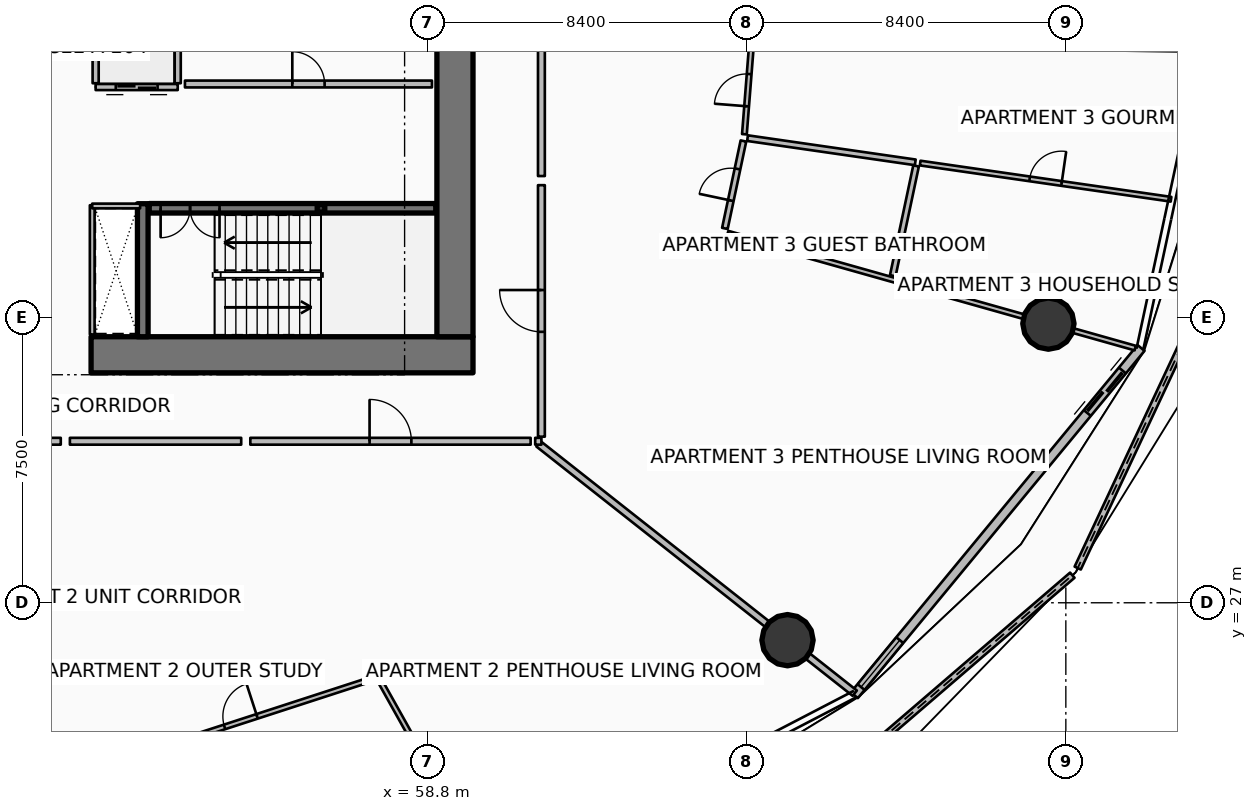
"""IFC4 building model, lengths in metres.
Left out: names, types, materials, properties, quantities, classifications, styles, units other than length and angle.
Written with IfcOpenShell. Run it as: python <this file> out.ifc"""

import sys

from ifc_helpers import new_model, si_unit, direction, frame, frame_2d, origin, origin_2d, place, context, subcontext, project, spatial, polyline, rectangle, hollow_rectangle, circle, outline, extrude, element, fill, save


model = new_model("IFC4")
c1 = context("Model", 3, precision=1e-05, world=origin(), true_north=direction((0.0, 1.0)))
c2 = subcontext(c1, "Body", "Model", "MODEL_VIEW")
j1 = project(units=[si_unit("LENGTHUNIT", "METRE"), si_unit("PLANEANGLEUNIT", "RADIAN")], contexts=[c1])
p1 = place(None, origin())
s1 = spatial("IfcSite", under=j1, at=p1, CompositionType="ELEMENT")
p2 = place(p1, origin())
s2 = spatial("IfcBuilding", under=s1, at=p2, CompositionType="ELEMENT")
p3 = place(p2, frame((0.0, 0.0, 45.15)))
s3 = spatial("IfcBuildingStorey", under=s2, at=p3, CompositionType="ELEMENT", Elevation=45.15)
p4 = place(p3, frame((49.95, 33.525, 0.0), z_axis=(0.0, 0.0, 1.0), x_axis=(1.0, 0.0, 0.0)))
e1 = element("IfcWall", 1, at=p4, inside=s3, PredefinedType="SHEAR", context=c2, shape_type="SweptSolid", body=[
    extrude(rectangle(XDim=10.05, YDim=0.95, at=frame_2d((5.025, 0.0))), origin(), (0.0, 0.0, 1.0), 3.75),
])
p5 = place(p3, frame((59.525, 34.0, 0.0), z_axis=(0.0, 0.0, 1.0), x_axis=(0.0, 1.0, 0.0)))
e2 = element("IfcWall", 2, at=p5, inside=s3, PredefinedType="SHEAR", context=c2, shape_type="SweptSolid", body=[
    extrude(rectangle(XDim=16.0, YDim=0.95, at=frame_2d((8.0, 0.0))), origin(), (0.0, 0.0, 1.0), 3.75),
])
p6 = place(p3, frame((51.31, 34.0, 0.0), z_axis=(0.0, 0.0, 1.0), x_axis=(0.0, 1.0, 0.0)))
e3 = element("IfcWall", 3, at=p6, inside=s3, PredefinedType="SHEAR", context=c2, shape_type="SweptSolid", body=[
    extrude(rectangle(XDim=3.5, YDim=0.28, at=frame_2d((1.75, 0.0))), origin(), (0.0, 0.0, 1.0), 3.75),
])
p7 = place(p3, frame((56.0, 37.38, 0.0), z_axis=(0.0, 0.0, 1.0), x_axis=(1.0, 0.0, 0.0)))
e4 = element("IfcColumn", 4, at=p7, inside=s3, PredefinedType="COLUMN", context=c2, shape_type="SweptSolid", body=[
    extrude(hollow_rectangle(XDim=0.2, YDim=0.2, WallThickness=0.01, InnerFilletRadius=0.01, OuterFilletRadius=0.02, at=origin_2d()), origin(), (0.0, 0.0, 1.0), 1.67),
])
for number, where, z_axis, x_axis in (
    (5, (68.276, 26.016, 0.0), (0.0, 0.0, 1.0), (1.0, 0.0, 0.0)),
    (6, (75.141, 34.345, 0.0), (0.0, 0.0, 1.0), (1.0, 0.0, 0.0)),
):
    element("IfcColumn", number, at=place(p3, frame(where, z_axis=z_axis, x_axis=x_axis)), inside=s3, PredefinedType="COLUMN", context=c2, shape_type="SweptSolid", body=[
        extrude(circle(Radius=0.675, at=origin_2d()), origin(), (0.0, 0.0, 1.0), 3.5),
    ])
p8 = place(p3, frame((66.92, 20.119, 0.0), z_axis=(0.0, 0.0, 1.0), x_axis=(0.758371329303, 0.651822772609, 0.0)))
e7 = element("IfcWall", 7, at=p8, inside=s3, PredefinedType="PARAPET", context=c2, shape_type="SweptSolid", body=[
    extrude(outline(polyline([(0.0, 0.0), (11.67, 0.0), (11.67, 1.148), (5.835, 1.284), (0.0, 1.483), (0.0, 0.0)])), frame((0.0, 0.09, 0.0), z_axis=(0.0, -1.0, 0.0), x_axis=(1.0, 0.0, 0.0)), (0.0, 0.0, 1.0), 0.18),
])
p9 = place(p3, frame((75.912, 27.913, 0.0), z_axis=(0.0, 0.0, 1.0), x_axis=(0.424187605295, 0.905574334615, 0.0)))
e8 = element("IfcWall", 8, at=p9, inside=s3, PredefinedType="PARAPET", context=c2, shape_type="SweptSolid", body=[
    extrude(outline(polyline([(0.0, 0.0), (12.446, 0.0), (12.446, 1.224), (6.223, 1.127), (0.0, 1.148), (0.0, 0.0)])), frame((0.0, 0.09, 0.0), z_axis=(0.0, -1.0, 0.0), x_axis=(1.0, 0.0, 0.0)), (0.0, 0.0, 1.0), 0.18),
])
p10 = place(p3, frame((70.033, 24.567, 0.0), z_axis=(0.0, 0.0, 1.0), x_axis=(0.636674332663, 0.771132799281, 0.0)))
e9 = element("IfcWall", 9, at=p10, inside=s3, PredefinedType="SOLIDWALL", context=c2, shape_type="SweptSolid", body=[
    extrude(rectangle(XDim=11.851, YDim=0.24, at=frame_2d((5.926, 0.0))), origin(), (0.0, 0.0, 1.0), 2.45),
])
p11 = place(p10, frame((9.631, 0.0, 0.0)))
e10 = element("IfcOpeningElement", 10, at=p11, cuts=e9, PredefinedType="OPENING", context=c2, shape_type="SweptSolid", body=[
    extrude(rectangle(XDim=1.45, YDim=2.15, at=frame_2d((0.725, 1.075))), frame((0.0, 0.13, 0.0), z_axis=(0.0, -1.0, 0.0), x_axis=(1.0, 0.0, 0.0)), (0.0, 0.0, 1.0), 0.26),
])
p12 = place(p10, frame((0.28, 0.0, 0.65)))
e11 = element("IfcOpeningElement", 11, at=p12, cuts=e9, PredefinedType="OPENING", context=c2, shape_type="SweptSolid", body=[
    extrude(rectangle(XDim=1.6, YDim=1.5, at=frame_2d((0.8, 0.75))), frame((0.0, 0.13, 0.0), z_axis=(0.0, -1.0, 0.0), x_axis=(1.0, 0.0, 0.0)), (0.0, 0.0, 1.0), 0.26),
])
p13 = place(p3, frame((51.48, 37.38, 0.0), z_axis=(0.0, 0.0, 1.0), x_axis=(1.0, 0.0, 0.0)))
e12 = element("IfcWall", 12, at=p13, inside=s3, PredefinedType="SOLIDWALL", context=c2, shape_type="SweptSolid", body=[
    extrude(rectangle(XDim=7.54, YDim=0.25, at=frame_2d((3.77, 0.0))), origin(), (0.0, 0.0, 1.0), 3.5),
])
p14 = place(p13, frame((0.3, 0.0, 0.0)))
e13 = element("IfcOpeningElement", 13, at=p14, cuts=e12, PredefinedType="OPENING", context=c2, shape_type="SweptSolid", body=[
    extrude(rectangle(XDim=1.55, YDim=2.15, at=frame_2d((0.775, 1.075))), frame((0.0, 0.135, 0.0), z_axis=(0.0, -1.0, 0.0), x_axis=(1.0, 0.0, 0.0)), (0.0, 0.0, 1.0), 0.27),
])
p15 = place(p3, frame((52.23, 40.57, 0.0), z_axis=(0.0, 0.0, 1.0), x_axis=(-1.0, 0.0, 0.0)))
e14 = element("IfcWall", 14, at=p15, inside=s3, PredefinedType="PARTITIONING", context=c2, shape_type="SweptSolid", body=[
    extrude(rectangle(XDim=2.16, YDim=0.16, at=frame_2d((1.08, 0.0))), origin(), (0.0, 0.0, 1.0), 3.5),
])
p16 = place(p15, frame((0.53, 0.0, 0.0)))
e15 = element("IfcOpeningElement", 15, at=p16, cuts=e14, PredefinedType="OPENING", context=c2, shape_type="SweptSolid", body=[
    extrude(rectangle(XDim=1.1, YDim=2.1, at=frame_2d((0.55, 1.05))), frame((0.0, 0.09, 0.0), z_axis=(0.0, -1.0, 0.0), x_axis=(1.0, 0.0, 0.0)), (0.0, 0.0, 1.0), 0.18),
])
for number, where, z_axis, x_axis in (
    (16, (52.23, 40.67, 0.0), (0.0, 0.0, 1.0), (0.0, 1.0, 0.0)),
    (17, (50.07, 40.67, 0.0), (0.0, 0.0, 1.0), (0.0, 1.0, 0.0)),
):
    element("IfcWall", number, at=place(p3, frame(where, z_axis=z_axis, x_axis=x_axis)), inside=s3, PredefinedType="PARTITIONING", context=c2, shape_type="SweptSolid", body=[
        extrude(rectangle(XDim=2.16, YDim=0.16, at=frame_2d((1.08, 0.0))), origin(), (0.0, 0.0, 1.0), 3.5),
    ])
p17 = place(p3, frame((52.42, 40.65, 0.0), z_axis=(0.0, 0.0, 1.0), x_axis=(1.0, 0.0, 0.0)))
e18 = element("IfcWall", 18, at=p17, inside=s3, PredefinedType="PARTITIONING", context=c2, shape_type="SweptSolid", body=[
    extrude(rectangle(XDim=6.5, YDim=0.18, at=frame_2d((3.25, 0.0))), origin(), (0.0, 0.0, 1.0), 3.5),
])
p18 = place(p17, frame((2.825, 0.0, 0.0)))
e19 = element("IfcOpeningElement", 19, at=p18, cuts=e18, PredefinedType="OPENING", context=c2, shape_type="SweptSolid", body=[
    extrude(rectangle(XDim=0.85, YDim=2.06, at=frame_2d((0.425, 1.03))), frame((0.0, 0.1, 0.0), z_axis=(0.0, -1.0, 0.0), x_axis=(1.0, 0.0, 0.0)), (0.0, 0.0, 1.0), 0.2),
])
p19 = place(p3, frame((49.98, 34.06, 0.0), z_axis=(0.0, 0.0, 1.0), x_axis=(0.0, 1.0, 0.0)))
e20 = element("IfcWall", 20, at=p19, inside=s3, PredefinedType="PARTITIONING", context=c2, shape_type="SweptSolid", body=[
    extrude(rectangle(XDim=3.4, YDim=0.125, at=frame_2d((1.7, 0.0))), origin(), (0.0, 0.0, 1.0), 2.94),
])
p20 = place(p3, frame((49.98, 37.44, 0.0), z_axis=(0.0, 0.0, 1.0), x_axis=(1.0, 0.0, 0.0)))
e21 = element("IfcWall", 21, at=p20, inside=s3, PredefinedType="PARTITIONING", context=c2, shape_type="SweptSolid", body=[
    extrude(rectangle(XDim=1.26, YDim=0.125, at=frame_2d((0.63, 0.0))), origin(), (0.0, 0.0, 1.0), 2.94),
])
p21 = place(p3, frame((61.723, 31.182, 0.0), z_axis=(0.0, 0.0, 1.0), x_axis=(0.785321288316, -0.619088421889, 0.0)))
e22 = element("IfcWall", 22, at=p21, inside=s3, PredefinedType="PARTITIONING", context=c2, shape_type="SweptSolid", body=[
    extrude(rectangle(XDim=10.598, YDim=0.18, at=frame_2d((5.299, 0.0))), origin(), (0.0, 0.0, 1.0), 2.867),
])
p22 = place(p3, frame((54.14, 31.25, 0.0), z_axis=(0.0, 0.0, 1.0), x_axis=(1.0, 0.0, 0.0)))
e23 = element("IfcWall", 23, at=p22, inside=s3, PredefinedType="PARTITIONING", context=c2, shape_type="SweptSolid", body=[
    extrude(rectangle(XDim=7.376, YDim=0.18, at=frame_2d((3.688, 0.0))), origin(), (0.0, 0.0, 1.0), 2.867),
])
p23 = place(p22, frame((3.138, 0.0, 0.0)))
e24 = element("IfcOpeningElement", 24, at=p23, cuts=e23, PredefinedType="OPENING", context=c2, shape_type="SweptSolid", body=[
    extrude(rectangle(XDim=1.1, YDim=2.1, at=frame_2d((0.55, 1.05))), frame((0.0, 0.1, 0.0), z_axis=(0.0, -1.0, 0.0), x_axis=(1.0, 0.0, 0.0)), (0.0, 0.0, 1.0), 0.2),
])
p24 = place(p3, frame((45.088, 31.25, 0.0), z_axis=(0.0, 0.0, 1.0), x_axis=(1.0, 0.0, 0.0)))
e25 = element("IfcWall", 25, at=p24, inside=s3, PredefinedType="PARTITIONING", context=c2, shape_type="SweptSolid", body=[
    extrude(rectangle(XDim=4.064, YDim=0.18, at=frame_2d((2.032, 0.0))), origin(), (0.0, 0.0, 1.0), 2.867),
])
p25 = place(p3, frame((49.392, 31.25, 0.0), z_axis=(0.0, 0.0, 1.0), x_axis=(1.0, 0.0, 0.0)))
e26 = element("IfcWall", 26, at=p25, inside=s3, PredefinedType="PARTITIONING", context=c2, shape_type="SweptSolid", body=[
    extrude(rectangle(XDim=4.508, YDim=0.18, at=frame_2d((2.254, 0.0))), origin(), (0.0, 0.0, 1.0), 2.867),
])
p26 = place(p3, frame((57.545, 24.957, 0.0), z_axis=(0.0, 0.0, 1.0), x_axis=(0.488592145891, -0.872512300758, 0.0)))
e27 = element("IfcWall", 27, at=p26, inside=s3, PredefinedType="PARTITIONING", context=c2, shape_type="SweptSolid", body=[
    extrude(rectangle(XDim=5.962, YDim=0.125, at=frame_2d((2.981, 0.0))), origin(), (0.0, 0.0, 1.0), 2.867),
])
p27 = place(p3, frame((50.389, 22.735, 0.0), z_axis=(0.0, 0.0, 1.0), x_axis=(0.951050149939, 0.309036587317, 0.0)))
e28 = element("IfcWall", 28, at=p27, inside=s3, PredefinedType="PARTITIONING", context=c2, shape_type="SweptSolid", body=[
    extrude(rectangle(XDim=7.363, YDim=0.125, at=frame_2d((3.681, 0.0))), origin(), (0.0, 0.0, 1.0), 2.867),
])
p28 = place(p27, frame((3.231, 0.0, 0.0)))
e29 = element("IfcOpeningElement", 29, at=p28, cuts=e28, PredefinedType="OPENING", context=c2, shape_type="SweptSolid", body=[
    extrude(rectangle(XDim=0.9, YDim=2.08, at=frame_2d((0.45, 1.04))), frame((0.0, 0.073, 0.0), z_axis=(0.0, -1.0, 0.0), x_axis=(1.0, 0.0, 0.0)), (0.0, 0.0, 1.0), 0.145),
])
p29 = place(p3, frame((61.636, 31.25, 0.0), z_axis=(0.0, 0.0, 1.0), x_axis=(1.0, 0.0, 0.0)))
e30 = element("IfcWall", 30, at=p29, inside=s3, PredefinedType="PARTITIONING", context=c2, shape_type="SweptSolid", body=[
    extrude(rectangle(XDim=0.164, YDim=0.18, at=frame_2d((0.082, 0.0))), origin(), (0.0, 0.0, 1.0), 2.867),
])
p30 = place(p3, frame((61.8, 31.37, 0.0), z_axis=(0.0, 0.0, 1.0), x_axis=(0.0, 1.0, 0.0)))
e31 = element("IfcWall", 31, at=p30, inside=s3, PredefinedType="PARTITIONING", context=c2, shape_type="SweptSolid", body=[
    extrude(rectangle(XDim=6.618, YDim=0.18, at=frame_2d((3.309, 0.0))), origin(), (0.0, 0.0, 1.0), 2.867),
])
p31 = place(p30, frame((2.759, 0.0, 0.0)))
e32 = element("IfcOpeningElement", 32, at=p31, cuts=e31, PredefinedType="OPENING", context=c2, shape_type="SweptSolid", body=[
    extrude(rectangle(XDim=1.1, YDim=2.1, at=frame_2d((0.55, 1.05))), frame((0.0, 0.1, 0.0), z_axis=(0.0, -1.0, 0.0), x_axis=(1.0, 0.0, 0.0)), (0.0, 0.0, 1.0), 0.2),
])
p32 = place(p3, frame((61.8, 38.228, 0.0), z_axis=(0.0, 0.0, 1.0), x_axis=(0.0, 1.0, 0.0)))
e33 = element("IfcWall", 33, at=p32, inside=s3, PredefinedType="PARTITIONING", context=c2, shape_type="SweptSolid", body=[
    extrude(rectangle(XDim=5.285, YDim=0.18, at=frame_2d((2.643, 0.0))), origin(), (0.0, 0.0, 1.0), 2.867),
])
p33 = place(p3, frame((66.703, 36.725, 0.0), z_axis=(0.0, 0.0, 1.0), x_axis=(0.962456868727, -0.271434662195, 0.0)))
e34 = element("IfcWall", 34, at=p33, inside=s3, PredefinedType="PARTITIONING", context=c2, shape_type="SweptSolid", body=[
    extrude(rectangle(XDim=11.141, YDim=0.125, at=frame_2d((5.571, 0.0))), origin(), (0.0, 0.0, 1.0), 2.867),
])
p34 = place(p3, frame((66.628, 36.85, 0.0), z_axis=(0.0, 0.0, 1.0), x_axis=(0.207543347309, 0.978225822082, 0.0)))
e35 = element("IfcWall", 35, at=p34, inside=s3, PredefinedType="PARTITIONING", context=c2, shape_type="SweptSolid", body=[
    extrude(rectangle(XDim=2.352, YDim=0.15, at=frame_2d((1.176, 0.0))), origin(), (0.0, 0.0, 1.0), 2.867),
])
p35 = place(p34, frame((0.751, 0.0, 0.0)))
e36 = element("IfcOpeningElement", 36, at=p35, cuts=e35, PredefinedType="OPENING", context=c2, shape_type="SweptSolid", body=[
    extrude(rectangle(XDim=0.85, YDim=2.06, at=frame_2d((0.425, 1.03))), frame((0.0, 0.085, 0.0), z_axis=(0.0, -1.0, 0.0), x_axis=(1.0, 0.0, 0.0)), (0.0, 0.0, 1.0), 0.17),
])
p36 = place(p3, frame((71.046, 35.604, 0.0), z_axis=(0.0, 0.0, 1.0), x_axis=(0.207542541756, 0.97822599299, 0.0)))
e37 = element("IfcWall", 37, at=p36, inside=s3, PredefinedType="PARTITIONING", context=c2, shape_type="SweptSolid", body=[
    extrude(rectangle(XDim=2.955, YDim=0.15, at=frame_2d((1.478, 0.0))), origin(), (0.0, 0.0, 1.0), 2.867),
])
p37 = place(p3, frame((67.224, 39.226, 0.0), z_axis=(0.0, 0.0, 1.0), x_axis=(0.989741519473, -0.142869607092, 0.0)))
e38 = element("IfcWall", 38, at=p37, inside=s3, PredefinedType="PARTITIONING", context=c2, shape_type="SweptSolid", body=[
    extrude(rectangle(XDim=4.46, YDim=0.15, at=frame_2d((2.23, 0.0))), origin(), (0.0, 0.0, 1.0), 2.94),
])
p38 = place(p3, frame((71.767, 38.57, 0.0), z_axis=(0.0, 0.0, 1.0), x_axis=(0.989747166196, -0.142830483468, 0.0)))
e39 = element("IfcWall", 39, at=p38, inside=s3, PredefinedType="PARTITIONING", context=c2, shape_type="SweptSolid", body=[
    extrude(rectangle(XDim=6.67, YDim=0.125, at=frame_2d((3.335, 0.0))), origin(), (0.0, 0.0, 1.0), 2.94),
])
p39 = place(p38, frame((2.91, 0.0, 0.0)))
e40 = element("IfcOpeningElement", 40, at=p39, cuts=e39, PredefinedType="OPENING", context=c2, shape_type="SweptSolid", body=[
    extrude(rectangle(XDim=0.85, YDim=2.06, at=frame_2d((0.425, 1.03))), frame((0.0, 0.073, 0.0), z_axis=(0.0, -1.0, 0.0), x_axis=(1.0, 0.0, 0.0)), (0.0, 0.0, 1.0), 0.145),
])
p40 = place(p3, frame((67.142, 39.328, 0.0), z_axis=(0.0, 0.0, 1.0), x_axis=(0.078573538032, 0.996908320319, 0.0)))
e41 = element("IfcWall", 41, at=p40, inside=s3, PredefinedType="PARTITIONING", context=c2, shape_type="SweptSolid", body=[
    extrude(rectangle(XDim=2.327, YDim=0.125, at=frame_2d((1.164, 0.0))), origin(), (0.0, 0.0, 1.0), 2.94),
])
p41 = place(p40, frame((0.739, 0.0, 0.0)))
e42 = element("IfcOpeningElement", 42, at=p41, cuts=e41, PredefinedType="OPENING", context=c2, shape_type="SweptSolid", body=[
    extrude(rectangle(XDim=0.85, YDim=2.06, at=frame_2d((0.425, 1.03))), frame((0.0, 0.073, 0.0), z_axis=(0.0, -1.0, 0.0), x_axis=(1.0, 0.0, 0.0)), (0.0, 0.0, 1.0), 0.145),
])
p42 = place(p11, origin())
e43 = element("IfcDoor", 43, at=p42, inside=s3, OperationType="DOUBLE_DOOR_SLIDING", PredefinedType="DOOR", context=c2, shape_type="SweptSolid", body=[
    extrude(rectangle(XDim=1.45, YDim=2.15, at=frame_2d((0.725, 1.075))), frame((0.0, 0.025, 0.0), z_axis=(0.0, -1.0, 0.0), x_axis=(1.0, 0.0, 0.0)), (0.0, 0.0, 1.0), 0.05),
])
fill(e10, e43)
p43 = place(p12, origin())
e44 = element("IfcWindow", 44, at=p43, inside=s3, PartitioningType="SINGLE_PANEL", PredefinedType="WINDOW", context=c2, shape_type="SweptSolid", body=[
    extrude(rectangle(XDim=1.6, YDim=1.5, at=frame_2d((0.8, 0.75))), frame((0.0, 0.03, 0.0), z_axis=(0.0, -1.0, 0.0), x_axis=(1.0, 0.0, 0.0)), (0.0, 0.0, 1.0), 0.06),
])
fill(e11, e44)
p44 = place(p14, origin())
e45 = element("IfcDoor", 45, at=p44, inside=s3, OperationType="DOUBLE_DOOR_SINGLE_SWING", PredefinedType="DOOR", context=c2, shape_type="SweptSolid", body=[
    extrude(rectangle(XDim=1.55, YDim=2.15, at=frame_2d((0.775, 1.075))), frame((0.0, 0.025, 0.0), z_axis=(0.0, -1.0, 0.0), x_axis=(1.0, 0.0, 0.0)), (0.0, 0.0, 1.0), 0.05),
])
fill(e13, e45)
p45 = place(p16, origin())
e46 = element("IfcDoor", 46, at=p45, inside=s3, OperationType="DOUBLE_DOOR_SLIDING", PredefinedType="DOOR", context=c2, shape_type="SweptSolid", body=[
    extrude(rectangle(XDim=1.1, YDim=2.1, at=frame_2d((0.55, 1.05))), frame((0.0, 0.025, 0.0), z_axis=(0.0, -1.0, 0.0), x_axis=(1.0, 0.0, 0.0)), (0.0, 0.0, 1.0), 0.05),
])
fill(e15, e46)
p46 = place(p18, origin())
e47 = element("IfcDoor", 47, at=p46, inside=s3, OperationType="SINGLE_SWING_LEFT", PredefinedType="DOOR", context=c2, shape_type="SweptSolid", body=[
    extrude(rectangle(XDim=0.85, YDim=2.06, at=frame_2d((0.425, 1.03))), frame((0.0, 0.025, 0.0), z_axis=(0.0, -1.0, 0.0), x_axis=(1.0, 0.0, 0.0)), (0.0, 0.0, 1.0), 0.05),
])
fill(e19, e47)
p47 = place(p23, origin())
e48 = element("IfcDoor", 48, at=p47, inside=s3, OperationType="SINGLE_SWING_LEFT", PredefinedType="DOOR", context=c2, shape_type="SweptSolid", body=[
    extrude(rectangle(XDim=1.1, YDim=2.1, at=frame_2d((0.55, 1.05))), frame((0.0, 0.025, 0.0), z_axis=(0.0, -1.0, 0.0), x_axis=(1.0, 0.0, 0.0)), (0.0, 0.0, 1.0), 0.05),
])
fill(e24, e48)
p48 = place(p28, origin())
e49 = element("IfcDoor", 49, at=p48, inside=s3, OperationType="SINGLE_SWING_RIGHT", PredefinedType="DOOR", context=c2, shape_type="SweptSolid", body=[
    extrude(rectangle(XDim=0.9, YDim=2.08, at=frame_2d((0.45, 1.04))), frame((0.0, 0.025, 0.0), z_axis=(0.0, -1.0, 0.0), x_axis=(1.0, 0.0, 0.0)), (0.0, 0.0, 1.0), 0.05),
])
fill(e29, e49)
p49 = place(p31, origin())
e50 = element("IfcDoor", 50, at=p49, inside=s3, OperationType="SINGLE_SWING_RIGHT", PredefinedType="DOOR", context=c2, shape_type="SweptSolid", body=[
    extrude(rectangle(XDim=1.1, YDim=2.1, at=frame_2d((0.55, 1.05))), frame((0.0, 0.025, 0.0), z_axis=(0.0, -1.0, 0.0), x_axis=(1.0, 0.0, 0.0)), (0.0, 0.0, 1.0), 0.05),
])
fill(e32, e50)
p50 = place(p35, origin())
e51 = element("IfcDoor", 51, at=p50, inside=s3, OperationType="SINGLE_SWING_LEFT", PredefinedType="DOOR", context=c2, shape_type="SweptSolid", body=[
    extrude(rectangle(XDim=0.85, YDim=2.06, at=frame_2d((0.425, 1.03))), frame((0.0, 0.025, 0.0), z_axis=(0.0, -1.0, 0.0), x_axis=(1.0, 0.0, 0.0)), (0.0, 0.0, 1.0), 0.05),
])
fill(e36, e51)
p51 = place(p39, origin())
e52 = element("IfcDoor", 52, at=p51, inside=s3, OperationType="SINGLE_SWING_RIGHT", PredefinedType="DOOR", context=c2, shape_type="SweptSolid", body=[
    extrude(rectangle(XDim=0.85, YDim=2.06, at=frame_2d((0.425, 1.03))), frame((0.0, 0.025, 0.0), z_axis=(0.0, -1.0, 0.0), x_axis=(1.0, 0.0, 0.0)), (0.0, 0.0, 1.0), 0.05),
])
fill(e40, e52)
p52 = place(p41, origin())
e53 = element("IfcDoor", 53, at=p52, inside=s3, OperationType="SINGLE_SWING_LEFT", PredefinedType="DOOR", context=c2, shape_type="SweptSolid", body=[
    extrude(rectangle(XDim=0.85, YDim=2.06, at=frame_2d((0.425, 1.03))), frame((0.0, 0.025, 0.0), z_axis=(0.0, -1.0, 0.0), x_axis=(1.0, 0.0, 0.0)), (0.0, 0.0, 1.0), 0.05),
])
fill(e42, e53)
save(model, sys.argv[1])
